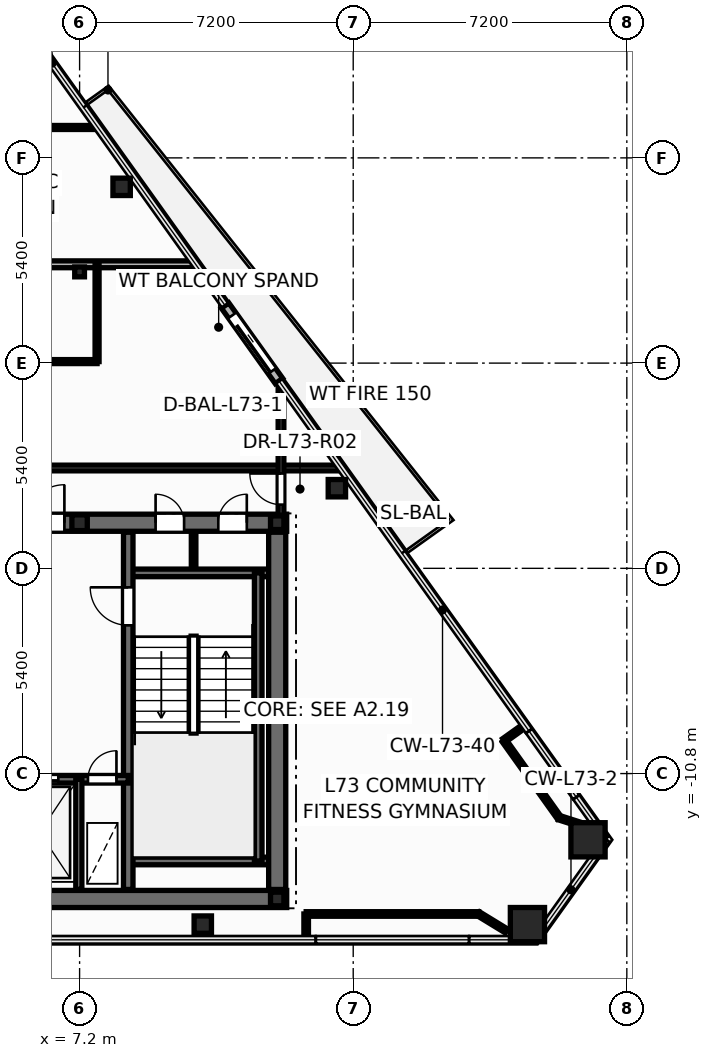
"""IFC4 building model, lengths in metres.
Left out: names, types, materials, properties, quantities, classifications, styles, units other than length and angle.
Written with IfcOpenShell. Run it as: python <this file> out.ifc"""

import sys

from ifc_helpers import new_model, si_unit, direction, frame, frame_2d, origin, origin_2d, place, context, subcontext, project, spatial, rectangle, hollow_rectangle, hollow_circle, i_section, extrude, element, fill, save


model = new_model("IFC4")
c1 = context("Model", 3, precision=1e-05, world=origin(), true_north=direction((0.0, 1.0)))
c2 = subcontext(c1, "Body", "Model", "MODEL_VIEW")
j1 = project(units=[si_unit("LENGTHUNIT", "METRE"), si_unit("PLANEANGLEUNIT", "RADIAN")], contexts=[c1])
p1 = place(None, origin())
s1 = spatial("IfcSite", under=j1, at=p1, CompositionType="ELEMENT")
p2 = place(p1, origin())
s2 = spatial("IfcBuilding", under=s1, at=p2, CompositionType="ELEMENT")
p3 = place(p2, frame((0.0, 0.0, 277.8)))
s3 = spatial("IfcBuildingStorey", under=s2, at=p3, CompositionType="ELEMENT", Elevation=277.8)
for number, where, z_axis, x_axis in (
    (1, (18.985, -14.774, 0.0), (0.0, 0.0, 1.0), (1.0, 0.0, 0.0)),
    (2, (20.579, -12.543, 0.0), (0.0, 0.0, 1.0), (1.0, 0.0, 0.0)),
):
    element("IfcColumn", number, at=place(p3, frame(where, z_axis=z_axis, x_axis=x_axis)), inside=s3, PredefinedType="COLUMN", context=c2, shape_type="SweptSolid", body=[
        extrude(hollow_rectangle(XDim=0.9, YDim=0.9, WallThickness=0.04, at=origin_2d()), origin(), (0.0, 0.0, 1.0), 3.6),
    ])
for number, where, z_axis, x_axis in (
    (3, (10.442, -14.774, 0.0), (0.0, 0.0, 1.0), (1.0, 0.0, 0.0)),
    (4, (13.97, -3.292, 0.0), (0.0, 0.0, 1.0), (1.0, 0.0, 0.0)),
    (5, (8.306, 4.638, 0.0), (0.0, 0.0, 1.0), (1.0, 0.0, 0.0)),
):
    element("IfcColumn", number, at=place(p3, frame(where, z_axis=z_axis, x_axis=x_axis)), inside=s3, PredefinedType="COLUMN", context=c2, shape_type="SweptSolid", body=[
        extrude(hollow_circle(Radius=0.229, WallThickness=0.016, at=origin_2d()), origin(), (0.0, 0.0, 1.0), 3.6),
    ])
for number, where, z_axis, x_axis in (
    (6, (12.4, -14.1, 0.0), (0.0, 0.0, 1.0), (1.0, 0.0, 0.0)),
    (7, (12.4, -4.2, 0.0), (0.0, 0.0, 1.0), (1.0, 0.0, 0.0)),
):
    element("IfcColumn", number, at=place(p3, frame(where, z_axis=z_axis, x_axis=x_axis)), inside=s3, PredefinedType="COLUMN", context=c2, shape_type="SweptSolid", body=[
        extrude(i_section(OverallWidth=0.352, OverallDepth=0.359, WebThickness=0.018, FlangeThickness=0.026, at=origin_2d()), origin(), (0.0, 0.0, 1.0), 3.6),
    ])
p4 = place(p3, frame((7.2, -4.2, 0.0), z_axis=(0.0, 0.0, 1.0), x_axis=(1.0, 0.0, 0.0)))
e8 = element("IfcColumn", 8, at=p4, inside=s3, PredefinedType="PILASTER", context=c2, shape_type="SweptSolid", body=[
    extrude(i_section(OverallWidth=0.405, OverallDepth=0.414, WebThickness=0.022, FlangeThickness=0.032, at=origin_2d()), origin(), (0.0, 0.0, 1.0), 3.6),
])
p5 = place(p3, frame((7.2, 2.4, 0.0), z_axis=(0.0, 0.0, 1.0), x_axis=(1.0, 0.0, 0.0)))
e9 = element("IfcColumn", 9, at=p5, inside=s3, PredefinedType="COLUMN", context=c2, shape_type="SweptSolid", body=[
    extrude(i_section(OverallWidth=0.256, OverallDepth=0.26, WebThickness=0.01, FlangeThickness=0.017, at=origin_2d()), origin(), (0.0, 0.0, 1.0), 3.6),
])
p6 = place(p3, frame((12.447, -0.471, -0.015), z_axis=(0.0, 0.0, 1.0), x_axis=(-0.581219264245, 0.813746991927, 0.0)))
e10 = element("IfcWall", 10, at=p6, inside=s3, PredefinedType="STANDARD", context=c2, shape_type="SweptSolid", body=[
    extrude(rectangle(XDim=2.44, YDim=0.24, at=frame_2d((1.22, 0.0))), origin(), (0.0, 0.0, 1.0), 2.878),
])
p7 = place(p6, frame((0.32, 0.0, 0.015)))
e11 = element("IfcOpeningElement", 11, at=p7, cuts=e10, PredefinedType="OPENING", context=c2, shape_type="SweptSolid", body=[
    extrude(rectangle(XDim=1.806, YDim=2.204, at=frame_2d((0.9, 1.102))), frame((0.0, 0.13, 0.0), z_axis=(0.0, -1.0, 0.0), x_axis=(1.0, 0.0, 0.0)), (0.0, 0.0, 1.0), 0.26),
])
p8 = place(p3, frame((10.2, -5.52, 0.0), z_axis=(0.0, 0.0, 1.0), x_axis=(0.0, 1.0, 0.0)))
e12 = element("IfcWall", 12, at=p8, inside=s3, PredefinedType="PARTITIONING", context=c2, shape_type="SweptSolid", body=[
    extrude(rectangle(XDim=1.12, YDim=0.12, at=frame_2d((0.56, 0.0))), origin(), (0.0, 0.0, 1.0), 3.345),
])
p9 = place(p3, frame((-12.65, -14.1, 0.0), z_axis=(0.0, 0.0, 1.0), x_axis=(1.0, 0.0, 0.0)))
e13 = element("IfcWall", 13, at=p9, inside=s3, PredefinedType="SHEAR", context=c2, shape_type="SweptSolid", body=[
    extrude(rectangle(XDim=25.3, YDim=0.45, at=frame_2d((12.65, 0.0))), origin(), (0.0, 0.0, 1.0), 3.6),
])
p10 = place(p3, frame((-12.65, -4.2, 0.0), z_axis=(0.0, 0.0, 1.0), x_axis=(1.0, 0.0, 0.0)))
e14 = element("IfcWall", 14, at=p10, inside=s3, PredefinedType="SHEAR", context=c2, shape_type="SweptSolid", body=[
    extrude(rectangle(XDim=25.3, YDim=0.45, at=frame_2d((12.65, 0.0))), origin(), (0.0, 0.0, 1.0), 3.6),
])
p11 = place(p10, frame((1.85, 0.0, 0.0)))
e15 = element("IfcOpeningElement", 15, at=p11, cuts=e14, PredefinedType="OPENING", context=c2, shape_type="SweptSolid", body=[
    extrude(rectangle(XDim=0.756, YDim=2.054, at=frame_2d((0.375, 1.027))), frame((0.0, 0.235, 0.0), z_axis=(0.0, -1.0, 0.0), x_axis=(1.0, 0.0, 0.0)), (0.0, 0.0, 1.0), 0.47),
])
p12 = place(p10, frame((21.85, 0.0, 0.0)))
e16 = element("IfcOpeningElement", 16, at=p12, cuts=e14, PredefinedType="OPENING", context=c2, shape_type="SweptSolid", body=[
    extrude(rectangle(XDim=0.756, YDim=2.054, at=frame_2d((0.375, 1.027))), frame((0.0, 0.235, 0.0), z_axis=(0.0, -1.0, 0.0), x_axis=(1.0, 0.0, 0.0)), (0.0, 0.0, 1.0), 0.47),
])
p13 = place(p10, frame((23.5, 0.0, 0.0)))
e17 = element("IfcOpeningElement", 17, at=p13, cuts=e14, PredefinedType="OPENING", context=c2, shape_type="SweptSolid", body=[
    extrude(rectangle(XDim=0.756, YDim=2.054, at=frame_2d((0.375, 1.027))), frame((0.0, 0.235, 0.0), z_axis=(0.0, -1.0, 0.0), x_axis=(1.0, 0.0, 0.0)), (0.0, 0.0, 1.0), 0.47),
])
p14 = place(p10, frame((5.85, 0.0, 0.0)))
e18 = element("IfcOpeningElement", 18, at=p14, cuts=e14, PredefinedType="OPENING", context=c2, shape_type="SweptSolid", body=[
    extrude(rectangle(XDim=1.006, YDim=2.104, at=frame_2d((0.5, 1.052))), frame((0.0, 0.235, 0.0), z_axis=(0.0, -1.0, 0.0), x_axis=(1.0, 0.0, 0.0)), (0.0, 0.0, 1.0), 0.47),
])
p15 = place(p10, frame((10.35, 0.0, 0.0)))
e19 = element("IfcOpeningElement", 19, at=p15, cuts=e14, PredefinedType="OPENING", context=c2, shape_type="SweptSolid", body=[
    extrude(rectangle(XDim=1.406, YDim=2.154, at=frame_2d((0.7, 1.077))), frame((0.0, 0.235, 0.0), z_axis=(0.0, -1.0, 0.0), x_axis=(1.0, 0.0, 0.0)), (0.0, 0.0, 1.0), 0.47),
])
p16 = place(p10, frame((18.45, 0.0, 0.0)))
e20 = element("IfcOpeningElement", 20, at=p16, cuts=e14, PredefinedType="OPENING", context=c2, shape_type="SweptSolid", body=[
    extrude(rectangle(XDim=1.006, YDim=2.104, at=frame_2d((0.5, 1.052))), frame((0.0, 0.235, 0.0), z_axis=(0.0, -1.0, 0.0), x_axis=(1.0, 0.0, 0.0)), (0.0, 0.0, 1.0), 0.47),
])
for number, where, z_axis, x_axis in (
    (21, (8.48, -5.52, 0.0), (0.0, 0.0, 1.0), (1.0, 0.0, 0.0)),
    (22, (8.48, -13.1, 0.0), (0.0, 0.0, 1.0), (1.0, 0.0, 0.0)),
):
    element("IfcWall", number, at=place(p3, frame(where, z_axis=z_axis, x_axis=x_axis)), inside=s3, PredefinedType="SOLIDWALL", context=c2, shape_type="SweptSolid", body=[
        extrude(rectangle(XDim=3.87, YDim=0.2, at=frame_2d((1.935, 0.0))), origin(), (0.0, 0.0, 1.0), 3.6),
    ])
p17 = place(p3, frame((11.9, -13.1, 0.0), z_axis=(0.0, 0.0, 1.0), x_axis=(0.0, 1.0, 0.0)))
e23 = element("IfcWall", 23, at=p17, inside=s3, PredefinedType="SOLIDWALL", context=c2, shape_type="SweptSolid", body=[
    extrude(rectangle(XDim=7.58, YDim=0.2, at=frame_2d((3.79, 0.0))), origin(), (0.0, 0.0, 1.0), 3.6),
])
p18 = place(p3, frame((8.48, -13.85, 0.0), z_axis=(0.0, 0.0, 1.0), x_axis=(0.0, 1.0, 0.0)))
e24 = element("IfcWall", 24, at=p18, inside=s3, PredefinedType="SHEAR", context=c2, shape_type="SweptSolid", body=[
    extrude(rectangle(XDim=9.4, YDim=0.25, at=frame_2d((4.7, 0.0))), origin(), (0.0, 0.0, 1.0), 3.6),
])
p19 = place(p18, frame((6.95, 0.0, 0.0)))
e25 = element("IfcOpeningElement", 25, at=p19, cuts=e24, PredefinedType="OPENING", context=c2, shape_type="SweptSolid", body=[
    extrude(rectangle(XDim=1.006, YDim=2.104, at=frame_2d((0.5, 1.052))), frame((0.0, 0.135, 0.0), z_axis=(0.0, -1.0, 0.0), x_axis=(1.0, 0.0, 0.0)), (0.0, 0.0, 1.0), 0.27),
])
p20 = place(p3, frame((5.12, -10.95, 0.0), z_axis=(0.0, 0.0, 1.0), x_axis=(1.0, 0.0, 0.0)))
e26 = element("IfcWall", 26, at=p20, inside=s3, PredefinedType="SOLIDWALL", context=c2, shape_type="SweptSolid", body=[
    extrude(rectangle(XDim=3.36, YDim=0.2, at=frame_2d((1.68, 0.0))), origin(), (0.0, 0.0, 1.0), 3.6),
])
p21 = place(p20, frame((0.42, 0.0, 0.0)))
e27 = element("IfcOpeningElement", 27, at=p21, cuts=e26, PredefinedType="OPENING", context=c2, shape_type="SweptSolid", body=[
    extrude(rectangle(XDim=1.106, YDim=2.104, at=frame_2d((0.55, 1.052))), frame((0.0, 0.11, 0.0), z_axis=(0.0, -1.0, 0.0), x_axis=(1.0, 0.0, 0.0)), (0.0, 0.0, 1.0), 0.22),
])
p22 = place(p20, frame((2.3, 0.0, 0.0)))
e28 = element("IfcOpeningElement", 28, at=p22, cuts=e26, PredefinedType="OPENING", context=c2, shape_type="SweptSolid", body=[
    extrude(rectangle(XDim=0.756, YDim=2.054, at=frame_2d((0.375, 1.027))), frame((0.0, 0.11, 0.0), z_axis=(0.0, -1.0, 0.0), x_axis=(1.0, 0.0, 0.0)), (0.0, 0.0, 1.0), 0.22),
])
p23 = place(p3, frame((7.18, -13.85, 0.0), z_axis=(0.0, 0.0, 1.0), x_axis=(0.0, 1.0, 0.0)))
e29 = element("IfcWall", 29, at=p23, inside=s3, PredefinedType="PARTITIONING", context=c2, shape_type="SweptSolid", body=[
    extrude(rectangle(XDim=2.9, YDim=0.16, at=frame_2d((1.45, 0.0))), origin(), (0.0, 0.0, 1.0), 2.57),
])
p24 = place(p3, frame((12.4, -13.85, 0.0), z_axis=(0.0, 0.0, 1.0), x_axis=(0.0, 1.0, 0.0)))
e30 = element("IfcWall", 30, at=p24, inside=s3, PredefinedType="SHEAR", context=c2, shape_type="SweptSolid", body=[
    extrude(rectangle(XDim=9.4, YDim=0.45, at=frame_2d((4.7, 0.0))), origin(), (0.0, 0.0, 1.0), 3.6),
])
p25 = place(p3, frame((1.9, -2.76, 0.0), z_axis=(0.0, 0.0, 1.0), x_axis=(1.0, 0.0, 0.0)))
e31 = element("IfcWall", 31, at=p25, inside=s3, PredefinedType="PARTITIONING", context=c2, shape_type="SweptSolid", body=[
    extrude(rectangle(XDim=12.182, YDim=0.15, at=frame_2d((6.091, 0.0))), origin(), (0.0, 0.0, 1.0), 2.32),
])
p26 = place(p25, frame((0.399, 0.0, 0.0)))
e32 = element("IfcOpeningElement", 32, at=p26, cuts=e31, PredefinedType="OPENING", context=c2, shape_type="SweptSolid", body=[
    extrude(rectangle(XDim=0.906, YDim=2.104, at=frame_2d((0.45, 1.052))), frame((0.0, 0.085, 0.0), z_axis=(0.0, -1.0, 0.0), x_axis=(1.0, 0.0, 0.0)), (0.0, 0.0, 1.0), 0.17),
])
p27 = place(p3, frame((-0.64, 6.2, 0.0), z_axis=(0.0, 0.0, 1.0), x_axis=(1.0, 0.0, 0.0)))
e33 = element("IfcWall", 33, at=p27, inside=s3, PredefinedType="PARTITIONING", context=c2, shape_type="SweptSolid", body=[
    extrude(rectangle(XDim=8.322, YDim=0.105, at=frame_2d((4.161, 0.0))), origin(), (0.0, 0.0, 1.0), 2.32),
])
p28 = place(p3, frame((1.96, 0.04, 0.0), z_axis=(0.0, 0.0, 1.0), x_axis=(1.0, 0.0, 0.0)))
e34 = element("IfcWall", 34, at=p28, inside=s3, PredefinedType="PARTITIONING", context=c2, shape_type="SweptSolid", body=[
    extrude(rectangle(XDim=5.7, YDim=0.105, at=frame_2d((2.85, 0.0))), origin(), (0.0, 0.0, 1.0), 2.32),
])
p29 = place(p28, frame((0.359, 0.0, 0.0)))
e35 = element("IfcOpeningElement", 35, at=p29, cuts=e34, PredefinedType="OPENING", context=c2, shape_type="SweptSolid", body=[
    extrude(rectangle(XDim=0.886, YDim=2.104, at=frame_2d((0.44, 1.052))), frame((0.0, 0.062, 0.0), z_axis=(0.0, -1.0, 0.0), x_axis=(1.0, 0.0, 0.0)), (0.0, 0.0, 1.0), 0.125),
])
p30 = place(p3, frame((-0.64, 2.6, 0.0), z_axis=(0.0, 0.0, 1.0), x_axis=(1.0, 0.0, 0.0)))
e36 = element("IfcWall", 36, at=p30, inside=s3, PredefinedType="PARTITIONING", context=c2, shape_type="SweptSolid", body=[
    extrude(rectangle(XDim=10.894, YDim=0.18, at=frame_2d((5.447, 0.0))), origin(), (0.0, 0.0, 1.0), 2.32),
])
p31 = place(p3, frame((13.162, -14.494, 0.0), z_axis=(0.0, 0.0, 1.0), x_axis=(1.0, 0.0, 0.0)))
e37 = element("IfcWall", 37, at=p31, inside=s3, PredefinedType="PARTITIONING", context=c2, shape_type="SweptSolid", body=[
    extrude(rectangle(XDim=4.539, YDim=0.12, at=frame_2d((2.27, 0.0))), origin(), (0.0, 0.0, 1.0), 3.345),
])
p32 = place(p3, frame((12.5, -4.24, 0.0), z_axis=(0.0, 0.0, 1.0), x_axis=(0.0, 1.0, 0.0)))
e38 = element("IfcWall", 38, at=p32, inside=s3, PredefinedType="PARTITIONING", context=c2, shape_type="SweptSolid", body=[
    extrude(rectangle(XDim=3.695, YDim=0.15, at=frame_2d((1.848, 0.0))), origin(), (0.0, 0.0, 1.0), 2.32),
])
p33 = place(p32, frame((0.516, 0.0, 0.0)))
e39 = element("IfcOpeningElement", 39, at=p33, cuts=e38, PredefinedType="OPENING", context=c2, shape_type="SweptSolid", body=[
    extrude(rectangle(XDim=0.826, YDim=2.104, at=frame_2d((0.41, 1.052))), frame((0.0, 0.085, 0.0), z_axis=(0.0, -1.0, 0.0), x_axis=(1.0, 0.0, 0.0)), (0.0, 0.0, 1.0), 0.17),
])
p34 = place(p3, frame((7.66, 0.04, 0.0), z_axis=(0.0, 0.0, 1.0), x_axis=(0.0, 1.0, 0.0)))
e40 = element("IfcWall", 40, at=p34, inside=s3, PredefinedType="PARTITIONING", context=c2, shape_type="SweptSolid", body=[
    extrude(rectangle(XDim=2.56, YDim=0.105, at=frame_2d((1.28, 0.0))), origin(), (0.0, 0.0, 1.0), 2.718),
])
p35 = place(p3, frame((19.82, -11.962, 0.0), z_axis=(0.0, 0.0, 1.0), x_axis=(-0.581293660329, 0.813693849344, 0.0)))
e41 = element("IfcWall", 41, at=p35, inside=s3, PredefinedType="PARTITIONING", context=c2, shape_type="SweptSolid", body=[
    extrude(rectangle(XDim=2.498, YDim=0.12, at=frame_2d((1.249, 0.0))), origin(), (0.0, 0.0, 1.0), 2.32),
])
p36 = place(p3, frame((17.701, -14.494, 0.0), z_axis=(0.0, 0.0, 1.0), x_axis=(0.853211335825, -0.521565352013, 0.0)))
e42 = element("IfcWall", 42, at=p36, inside=s3, PredefinedType="PARTITIONING", context=c2, shape_type="SweptSolid", body=[
    extrude(rectangle(XDim=0.856, YDim=0.12, at=frame_2d((0.428, 0.0))), origin(), (0.0, 0.0, 1.0), 2.863),
])
p37 = place(p3, frame((20.633, -12.222, 0.0), z_axis=(0.0, 0.0, 1.0), x_axis=(-0.952390933617, 0.304879500071, 0.0)))
e43 = element("IfcWall", 43, at=p37, inside=s3, PredefinedType="PARTITIONING", context=c2, shape_type="SweptSolid", body=[
    extrude(rectangle(XDim=0.854, YDim=0.12, at=frame_2d((0.427, 0.0))), origin(), (0.0, 0.0, 1.0), 2.32),
])
for number, where, z_axis, x_axis in (
    (44, (13.162, -15.164, 0.0), (0.0, 0.0, 1.0), (0.0, 1.0, 0.0)),
    (45, (18.368, -9.929, 0.0), (0.0, 0.0, 1.0), (0.814, 0.581, 0.0)),
):
    element("IfcWall", number, at=place(p3, frame(where, z_axis=z_axis, x_axis=x_axis)), inside=s3, PredefinedType="PARTITIONING", context=c2, shape_type="SweptSolid", body=[
        extrude(rectangle(XDim=0.67, YDim=0.12, at=frame_2d((0.335, 0.0))), origin(), (0.0, 0.0, 1.0), 2.863),
    ])
p38 = place(p7, origin())
e46 = element("IfcDoor", 46, at=p38, inside=s3, OperationType="SLIDING_TO_LEFT", PredefinedType="DOOR", context=c2, shape_type="SweptSolid", body=[
    extrude(rectangle(XDim=1.8, YDim=2.2, at=frame_2d((0.9, 1.1))), frame((0.0, 0.025, 0.0), z_axis=(0.0, -1.0, 0.0), x_axis=(1.0, 0.0, 0.0)), (0.0, 0.0, 1.0), 0.05),
])
fill(e11, e46)
p39 = place(p19, origin())
e47 = element("IfcDoor", 47, at=p39, inside=s3, OperationType="SINGLE_SWING_RIGHT", PredefinedType="DOOR", context=c2, shape_type="SweptSolid", body=[
    extrude(rectangle(XDim=1.0, YDim=2.1, at=frame_2d((0.5, 1.05))), frame((0.0, 0.025, 0.0), z_axis=(0.0, -1.0, 0.0), x_axis=(1.0, 0.0, 0.0)), (0.0, 0.0, 1.0), 0.05),
])
fill(e25, e47)
p40 = place(p21, origin())
e48 = element("IfcDoor", 48, at=p40, inside=s3, OperationType="DOUBLE_DOOR_SLIDING", PredefinedType="DOOR", context=c2, shape_type="SweptSolid", body=[
    extrude(rectangle(XDim=1.1, YDim=2.1, at=frame_2d((0.55, 1.05))), frame((0.0, 0.025, 0.0), z_axis=(0.0, -1.0, 0.0), x_axis=(1.0, 0.0, 0.0)), (0.0, 0.0, 1.0), 0.05),
])
fill(e27, e48)
p41 = place(p22, origin())
e49 = element("IfcDoor", 49, at=p41, inside=s3, OperationType="SINGLE_SWING_RIGHT", PredefinedType="DOOR", context=c2, shape_type="SweptSolid", body=[
    extrude(rectangle(XDim=0.75, YDim=2.05, at=frame_2d((0.375, 1.025))), frame((0.0, 0.025, 0.0), z_axis=(0.0, -1.0, 0.0), x_axis=(1.0, 0.0, 0.0)), (0.0, 0.0, 1.0), 0.05),
])
fill(e28, e49)
p42 = place(p12, origin())
e50 = element("IfcDoor", 50, at=p42, inside=s3, OperationType="SINGLE_SWING_LEFT", PredefinedType="DOOR", context=c2, shape_type="SweptSolid", body=[
    extrude(rectangle(XDim=0.75, YDim=2.05, at=frame_2d((0.375, 1.025))), frame((0.0, 0.025, 0.0), z_axis=(0.0, -1.0, 0.0), x_axis=(1.0, 0.0, 0.0)), (0.0, 0.0, 1.0), 0.05),
])
fill(e16, e50)
p43 = place(p13, origin())
e51 = element("IfcDoor", 51, at=p43, inside=s3, OperationType="SINGLE_SWING_RIGHT", PredefinedType="DOOR", context=c2, shape_type="SweptSolid", body=[
    extrude(rectangle(XDim=0.75, YDim=2.05, at=frame_2d((0.375, 1.025))), frame((0.0, 0.025, 0.0), z_axis=(0.0, -1.0, 0.0), x_axis=(1.0, 0.0, 0.0)), (0.0, 0.0, 1.0), 0.05),
])
fill(e17, e51)
p44 = place(p16, origin())
e52 = element("IfcDoor", 52, at=p44, inside=s3, OperationType="SINGLE_SWING_RIGHT", PredefinedType="DOOR", context=c2, shape_type="SweptSolid", body=[
    extrude(rectangle(XDim=1.0, YDim=2.1, at=frame_2d((0.5, 1.05))), frame((0.0, 0.025, 0.0), z_axis=(0.0, -1.0, 0.0), x_axis=(1.0, 0.0, 0.0)), (0.0, 0.0, 1.0), 0.05),
])
fill(e20, e52)
p45 = place(p33, origin())
e53 = element("IfcDoor", 53, at=p45, inside=s3, OperationType="SINGLE_SWING_RIGHT", PredefinedType="DOOR", context=c2, shape_type="SweptSolid", body=[
    extrude(rectangle(XDim=0.82, YDim=2.1, at=frame_2d((0.41, 1.05))), frame((0.0, 0.025, 0.0), z_axis=(0.0, -1.0, 0.0), x_axis=(1.0, 0.0, 0.0)), (0.0, 0.0, 1.0), 0.05),
])
fill(e39, e53)
save(model, sys.argv[1])
